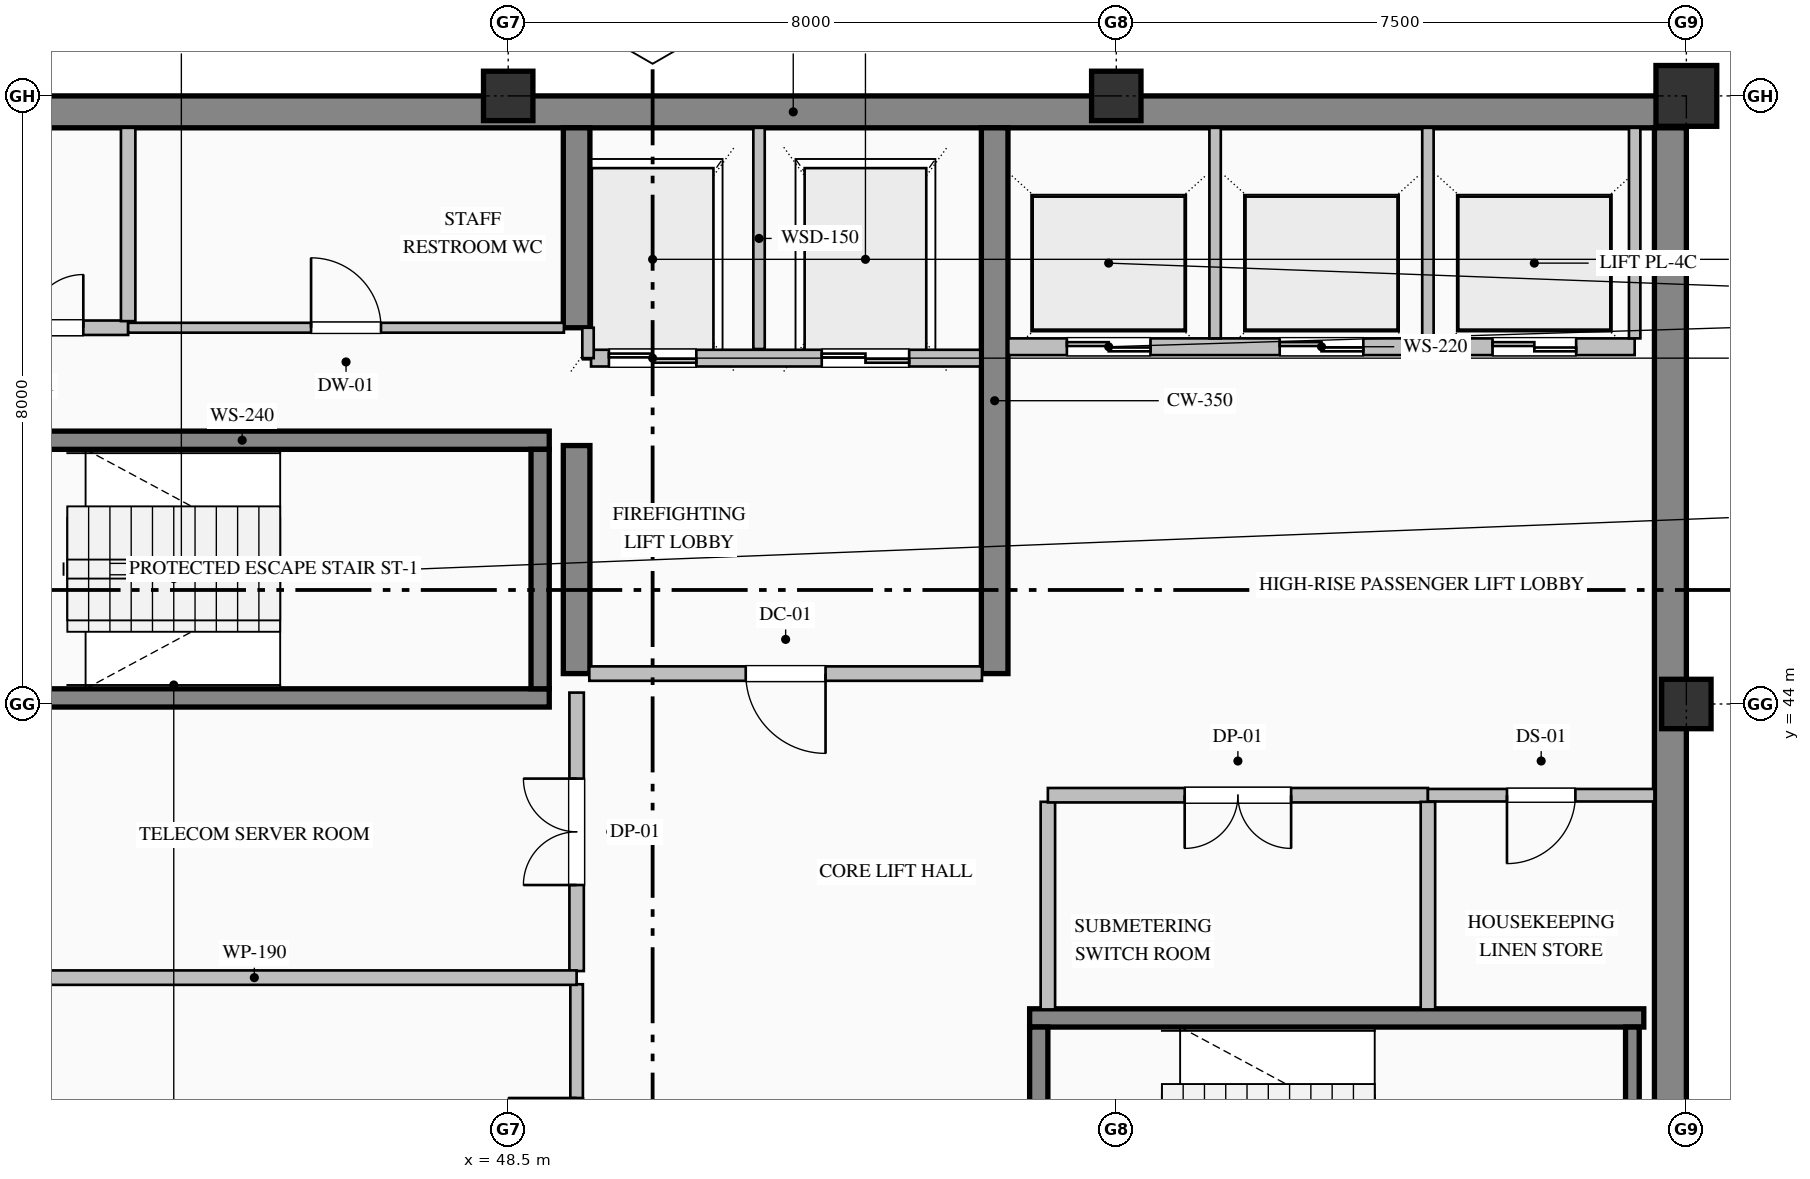
"""IFC4 building model, lengths in metres.
Left out: names, types, materials, properties, quantities, classifications, styles, units other than length and angle.
Written with IfcOpenShell. Run it as: python <this file> out.ifc"""

import sys

from ifc_helpers import new_model, si_unit, direction, frame, frame_2d, origin, origin_2d, place, context, subcontext, project, spatial, rectangle, hollow_rectangle, extrude, element, fill, save


model = new_model("IFC4")
c1 = context("Model", 3, precision=1e-05, world=origin(), true_north=direction((0.0, 1.0)))
c2 = subcontext(c1, "Body", "Model", "MODEL_VIEW")
j1 = project(units=[si_unit("LENGTHUNIT", "METRE"), si_unit("PLANEANGLEUNIT", "RADIAN")], contexts=[c1])
p1 = place(None, origin())
s1 = spatial("IfcSite", under=j1, at=p1, CompositionType="ELEMENT")
p2 = place(p1, origin())
s2 = spatial("IfcBuilding", under=s1, at=p2, CompositionType="ELEMENT")
p3 = place(p2, frame((0.0, 0.0, 359.2)))
s3 = spatial("IfcBuildingStorey", under=s2, at=p3, CompositionType="ELEMENT", Elevation=359.2)
p4 = place(p3, frame((40.5, 51.79, 0.0), z_axis=(0.0, 0.0, 1.0), x_axis=(1.0, 0.0, 0.0)))
e1 = element("IfcWall", 1, at=p4, inside=s3, PredefinedType="SHEAR", context=c2, shape_type="SweptSolid", body=[
    extrude(rectangle(XDim=23.5, YDim=0.42, at=frame_2d((11.75, 0.0))), origin(), (0.0, 0.0, 1.0), 3.785),
])
p5 = place(p3, frame((63.79, 36.32, 0.0), z_axis=(0.0, 0.0, 1.0), x_axis=(0.0, 1.0, 0.0)))
e2 = element("IfcWall", 2, at=p5, inside=s3, PredefinedType="SHEAR", context=c2, shape_type="SweptSolid", body=[
    extrude(rectangle(XDim=15.26, YDim=0.42, at=frame_2d((7.63, 0.0))), origin(), (0.0, 0.0, 1.0), 3.785),
])
p6 = place(p3, frame((49.4, 44.4, 0.0), z_axis=(0.0, 0.0, 1.0), x_axis=(0.0, 1.0, 0.0)))
e3 = element("IfcWall", 3, at=p6, inside=s3, PredefinedType="SHEAR", context=c2, shape_type="SweptSolid", body=[
    extrude(rectangle(XDim=3.0, YDim=0.35, at=frame_2d((1.5, 0.0))), origin(), (0.0, 0.0, 1.0), 3.785),
])
p7 = place(p3, frame((49.4, 48.95, 0.0), z_axis=(0.0, 0.0, 1.0), x_axis=(0.0, 1.0, 0.0)))
e4 = element("IfcWall", 4, at=p7, inside=s3, PredefinedType="SHEAR", context=c2, shape_type="SweptSolid", body=[
    extrude(rectangle(XDim=2.63, YDim=0.35, at=frame_2d((1.315, 0.0))), origin(), (0.0, 0.0, 1.0), 3.785),
])
p8 = place(p3, frame((54.9, 44.4, 0.0), z_axis=(0.0, 0.0, 1.0), x_axis=(0.0, 1.0, 0.0)))
e5 = element("IfcWall", 5, at=p8, inside=s3, PredefinedType="SHEAR", context=c2, shape_type="SweptSolid", body=[
    extrude(rectangle(XDim=7.18, YDim=0.35, at=frame_2d((3.59, 0.0))), origin(), (0.0, 0.0, 1.0), 3.785),
])
for number, where, z_axis, x_axis in (
    (6, (48.5, 52.0, 0.0), (0.0, 0.0, 1.0), (1.0, 0.0, 0.0)),
    (7, (56.5, 52.0, 0.0), (0.0, 0.0, 1.0), (1.0, 0.0, 0.0)),
    (8, (64.0, 44.0, 0.0), (0.0, 0.0, 1.0), (1.0, 0.0, 0.0)),
):
    element("IfcColumn", number, at=place(p3, frame(where, z_axis=z_axis, x_axis=x_axis)), inside=s3, PredefinedType="COLUMN", context=c2, shape_type="SweptSolid", body=[
        extrude(hollow_rectangle(XDim=0.65, YDim=0.65, WallThickness=0.028, at=origin_2d()), origin(), (0.0, 0.0, 1.0), 4.0),
    ])
p9 = place(p3, frame((64.0, 52.0, 0.0), z_axis=(0.0, 0.0, 1.0), x_axis=(1.0, 0.0, 0.0)))
e9 = element("IfcColumn", 9, at=p9, inside=s3, PredefinedType="COLUMN", context=c2, shape_type="SweptSolid", body=[
    extrude(hollow_rectangle(XDim=0.8, YDim=0.8, WallThickness=0.032, at=origin_2d()), origin(), (0.0, 0.0, 1.0), 4.0),
])
for number, where, z_axis, x_axis in (
    (10, (40.96, 47.47, 0.0), (0.0, 0.0, 1.0), (1.0, 0.0, 0.0)),
    (11, (49.04, 44.08, 0.0), (0.0, 0.0, 1.0), (-1.0, 0.0, 0.0)),
):
    element("IfcWall", number, at=place(p3, frame(where, z_axis=z_axis, x_axis=x_axis)), inside=s3, PredefinedType="SOLIDWALL", context=c2, shape_type="SweptSolid", body=[
        extrude(rectangle(XDim=8.08, YDim=0.24, at=frame_2d((4.04, 0.0))), origin(), (0.0, 0.0, 1.0), 4.0),
    ])
p10 = place(p3, frame((48.92, 44.2, 0.0), z_axis=(0.0, 0.0, 1.0), x_axis=(0.0, 1.0, 0.0)))
e12 = element("IfcWall", 12, at=p10, inside=s3, PredefinedType="SOLIDWALL", context=c2, shape_type="SweptSolid", body=[
    extrude(rectangle(XDim=3.15, YDim=0.24, at=frame_2d((1.575, 0.0))), origin(), (0.0, 0.0, 1.0), 4.0),
])
p11 = place(p3, frame((55.36, 39.87, 0.0), z_axis=(0.0, 0.0, 1.0), x_axis=(1.0, 0.0, 0.0)))
e13 = element("IfcWall", 13, at=p11, inside=s3, PredefinedType="SOLIDWALL", context=c2, shape_type="SweptSolid", body=[
    extrude(rectangle(XDim=8.08, YDim=0.24, at=frame_2d((4.04, 0.0))), origin(), (0.0, 0.0, 1.0), 4.0),
])
p12 = place(p3, frame((55.48, 39.75, 0.0), z_axis=(0.0, 0.0, 1.0), x_axis=(0.0, -1.0, 0.0)))
e14 = element("IfcWall", 14, at=p12, inside=s3, PredefinedType="SOLIDWALL", context=c2, shape_type="SweptSolid", body=[
    extrude(rectangle(XDim=3.15, YDim=0.24, at=frame_2d((1.575, 0.0))), origin(), (0.0, 0.0, 1.0), 4.0),
])
p13 = place(p12, frame((1.0, 0.0, 0.0)))
e15 = element("IfcOpeningElement", 15, at=p13, cuts=e14, PredefinedType="OPENING", context=c2, shape_type="SweptSolid", body=[
    extrude(rectangle(XDim=1.15, YDim=2.2, at=frame_2d((0.575, 1.1))), frame((0.0, 0.13, 0.0), z_axis=(0.0, -1.0, 0.0), x_axis=(1.0, 0.0, 0.0)), (0.0, 0.0, 1.0), 0.26),
])
p14 = place(p3, frame((63.29, 36.6, 0.0), z_axis=(0.0, 0.0, 1.0), x_axis=(0.0, 1.0, 0.0)))
e16 = element("IfcWall", 16, at=p14, inside=s3, PredefinedType="SOLIDWALL", context=c2, shape_type="SweptSolid", body=[
    extrude(rectangle(XDim=3.15, YDim=0.18, at=frame_2d((1.575, 0.0))), origin(), (0.0, 0.0, 1.0), 4.0),
])
p15 = place(p3, frame((54.71, 48.55, 0.0), z_axis=(0.0, 0.0, 1.0), x_axis=(-1.0, 0.0, 0.0)))
e17 = element("IfcWall", 17, at=p15, inside=s3, PredefinedType="PARTITIONING", context=c2, shape_type="SweptSolid", body=[
    extrude(rectangle(XDim=5.12, YDim=0.22, at=frame_2d((2.56, 0.0))), origin(), (0.0, 0.0, 1.0), 3.785),
])
p16 = place(p15, frame((3.735, 0.0, 0.0)))
e18 = element("IfcOpeningElement", 18, at=p16, cuts=e17, PredefinedType="OPENING", context=c2, shape_type="SweptSolid", body=[
    extrude(rectangle(XDim=1.15, YDim=2.2, at=frame_2d((0.575, 1.1))), frame((0.0, 0.12, 0.0), z_axis=(0.0, -1.0, 0.0), x_axis=(1.0, 0.0, 0.0)), (0.0, 0.0, 1.0), 0.24),
])
p17 = place(p15, frame((0.935, 0.0, 0.0)))
e19 = element("IfcOpeningElement", 19, at=p17, cuts=e17, PredefinedType="OPENING", context=c2, shape_type="SweptSolid", body=[
    extrude(rectangle(XDim=1.15, YDim=2.2, at=frame_2d((0.575, 1.1))), frame((0.0, 0.12, 0.0), z_axis=(0.0, -1.0, 0.0), x_axis=(1.0, 0.0, 0.0)), (0.0, 0.0, 1.0), 0.24),
])
p18 = place(p3, frame((51.8, 48.67, 0.0), z_axis=(0.0, 0.0, 1.0), x_axis=(0.0, 1.0, 0.0)))
e20 = element("IfcWall", 20, at=p18, inside=s3, PredefinedType="PARTITIONING", context=c2, shape_type="SweptSolid", body=[
    extrude(rectangle(XDim=2.91, YDim=0.15, at=frame_2d((1.455, 0.0))), origin(), (0.0, 0.0, 1.0), 3.785),
])
p19 = place(p3, frame((49.55, 48.55, 0.0), z_axis=(0.0, 0.0, 1.0), x_axis=(0.0, 1.0, 0.0)))
e21 = element("IfcWall", 21, at=p19, inside=s3, PredefinedType="PARTITIONING", context=c2, shape_type="SweptSolid", body=[
    extrude(rectangle(XDim=0.4, YDim=0.15, at=frame_2d((0.2, 0.0))), origin(), (0.0, 0.0, 1.0), 3.785),
])
p20 = place(p3, frame((63.32, 48.7, 0.0), z_axis=(0.0, 0.0, 1.0), x_axis=(-1.0, 0.0, 0.0)))
e22 = element("IfcWall", 22, at=p20, inside=s3, PredefinedType="PARTITIONING", context=c2, shape_type="SweptSolid", body=[
    extrude(rectangle(XDim=8.24, YDim=0.22, at=frame_2d((4.12, 0.0))), origin(), (0.0, 0.0, 1.0), 3.785),
])
p21 = place(p20, frame((6.37, 0.0, 0.0)))
e23 = element("IfcOpeningElement", 23, at=p21, cuts=e22, PredefinedType="OPENING", context=c2, shape_type="SweptSolid", body=[
    extrude(rectangle(XDim=1.1, YDim=2.2, at=frame_2d((0.55, 1.1))), frame((0.0, 0.12, 0.0), z_axis=(0.0, -1.0, 0.0), x_axis=(1.0, 0.0, 0.0)), (0.0, 0.0, 1.0), 0.24),
])
p22 = place(p20, frame((3.57, 0.0, 0.0)))
e24 = element("IfcOpeningElement", 24, at=p22, cuts=e22, PredefinedType="OPENING", context=c2, shape_type="SweptSolid", body=[
    extrude(rectangle(XDim=1.1, YDim=2.2, at=frame_2d((0.55, 1.1))), frame((0.0, 0.12, 0.0), z_axis=(0.0, -1.0, 0.0), x_axis=(1.0, 0.0, 0.0)), (0.0, 0.0, 1.0), 0.24),
])
p23 = place(p20, frame((0.77, 0.0, 0.0)))
e25 = element("IfcOpeningElement", 25, at=p23, cuts=e22, PredefinedType="OPENING", context=c2, shape_type="SweptSolid", body=[
    extrude(rectangle(XDim=1.1, YDim=2.2, at=frame_2d((0.55, 1.1))), frame((0.0, 0.12, 0.0), z_axis=(0.0, -1.0, 0.0), x_axis=(1.0, 0.0, 0.0)), (0.0, 0.0, 1.0), 0.24),
])
for number, where, z_axis, x_axis in (
    (26, (57.8, 48.81, 0.0), (0.0, 0.0, 1.0), (0.0, 1.0, 0.0)),
    (27, (60.6, 48.81, 0.0), (0.0, 0.0, 1.0), (0.0, 1.0, 0.0)),
    (28, (63.32, 48.81, 0.0), (0.0, 0.0, 1.0), (0.0, 1.0, 0.0)),
):
    element("IfcWall", number, at=place(p3, frame(where, z_axis=z_axis, x_axis=x_axis)), inside=s3, PredefinedType="PARTITIONING", context=c2, shape_type="SweptSolid", body=[
        extrude(rectangle(XDim=2.77, YDim=0.15, at=frame_2d((1.385, 0.0))), origin(), (0.0, 0.0, 1.0), 3.785),
    ])
p24 = place(p3, frame((40.92, 48.95, 0.0), z_axis=(0.0, 0.0, 1.0), x_axis=(1.0, 0.0, 0.0)))
e29 = element("IfcWall", 29, at=p24, inside=s3, PredefinedType="PARTITIONING", context=c2, shape_type="SweptSolid", body=[
    extrude(rectangle(XDim=2.58, YDim=0.19, at=frame_2d((1.29, 0.0))), origin(), (0.0, 0.0, 1.0), 3.785),
])
p25 = place(p24, frame((0.59, 0.0, 0.0)))
e30 = element("IfcOpeningElement", 30, at=p25, cuts=e29, PredefinedType="OPENING", context=c2, shape_type="SweptSolid", body=[
    extrude(rectangle(XDim=1.4, YDim=2.25, at=frame_2d((0.7, 1.125))), frame((0.0, 0.105, 0.0), z_axis=(0.0, -1.0, 0.0), x_axis=(1.0, 0.0, 0.0)), (0.0, 0.0, 1.0), 0.21),
])
p26 = place(p3, frame((43.5, 48.95, 0.0), z_axis=(0.0, 0.0, 1.0), x_axis=(1.0, 0.0, 0.0)))
e31 = element("IfcWall", 31, at=p26, inside=s3, PredefinedType="PARTITIONING", context=c2, shape_type="SweptSolid", body=[
    extrude(rectangle(XDim=5.733, YDim=0.13, at=frame_2d((2.866, 0.0))), origin(), (0.0, 0.0, 1.0), 3.785),
])
p27 = place(p26, frame((2.406, 0.0, 0.0)))
e32 = element("IfcOpeningElement", 32, at=p27, cuts=e31, PredefinedType="OPENING", context=c2, shape_type="SweptSolid", body=[
    extrude(rectangle(XDim=0.92, YDim=2.15, at=frame_2d((0.46, 1.075))), frame((0.0, 0.075, 0.0), z_axis=(0.0, -1.0, 0.0), x_axis=(1.0, 0.0, 0.0)), (0.0, 0.0, 1.0), 0.15),
])
p28 = place(p3, frame((54.733, 44.4, 0.0), z_axis=(0.0, 0.0, 1.0), x_axis=(-1.0, 0.0, 0.0)))
e33 = element("IfcWall", 33, at=p28, inside=s3, PredefinedType="PARTITIONING", context=c2, shape_type="SweptSolid", body=[
    extrude(rectangle(XDim=5.166, YDim=0.19, at=frame_2d((2.583, 0.0))), origin(), (0.0, 0.0, 1.0), 3.785),
])
p29 = place(p28, frame((2.058, 0.0, 0.0)))
e34 = element("IfcOpeningElement", 34, at=p29, cuts=e33, PredefinedType="OPENING", context=c2, shape_type="SweptSolid", body=[
    extrude(rectangle(XDim=1.05, YDim=2.15, at=frame_2d((0.525, 1.075))), frame((0.0, 0.105, 0.0), z_axis=(0.0, -1.0, 0.0), x_axis=(1.0, 0.0, 0.0)), (0.0, 0.0, 1.0), 0.21),
])
p30 = place(p3, frame((49.4, 36.42, 0.0), z_axis=(0.0, 0.0, 1.0), x_axis=(0.0, 1.0, 0.0)))
e35 = element("IfcWall", 35, at=p30, inside=s3, PredefinedType="PARTITIONING", context=c2, shape_type="SweptSolid", body=[
    extrude(rectangle(XDim=3.893, YDim=0.165, at=frame_2d((1.947, 0.0))), origin(), (0.0, 0.0, 1.0), 3.027),
])
p31 = place(p30, frame((1.497, 0.0, 0.0)))
e36 = element("IfcOpeningElement", 36, at=p31, cuts=e35, PredefinedType="OPENING", context=c2, shape_type="SweptSolid", body=[
    extrude(rectangle(XDim=0.9, YDim=2.15, at=frame_2d((0.45, 1.075))), frame((0.0, 0.093, 0.0), z_axis=(0.0, -1.0, 0.0), x_axis=(1.0, 0.0, 0.0)), (0.0, 0.0, 1.0), 0.185),
])
p32 = place(p3, frame((49.4, 40.487, 0.0), z_axis=(0.0, 0.0, 1.0), x_axis=(0.0, 1.0, 0.0)))
e37 = element("IfcWall", 37, at=p32, inside=s3, PredefinedType="PARTITIONING", context=c2, shape_type="SweptSolid", body=[
    extrude(rectangle(XDim=3.663, YDim=0.19, at=frame_2d((1.832, 0.0))), origin(), (0.0, 0.0, 1.0), 3.027),
])
p33 = place(p32, frame((1.132, 0.0, 0.0)))
e38 = element("IfcOpeningElement", 38, at=p33, cuts=e37, PredefinedType="OPENING", context=c2, shape_type="SweptSolid", body=[
    extrude(rectangle(XDim=1.4, YDim=2.25, at=frame_2d((0.7, 1.125))), frame((0.0, 0.105, 0.0), z_axis=(0.0, -1.0, 0.0), x_axis=(1.0, 0.0, 0.0)), (0.0, 0.0, 1.0), 0.21),
])
p34 = place(p3, frame((55.6, 42.713, 0.0), z_axis=(0.0, 0.0, 1.0), x_axis=(0.0, -1.0, 0.0)))
e39 = element("IfcWall", 39, at=p34, inside=s3, PredefinedType="PARTITIONING", context=c2, shape_type="SweptSolid", body=[
    extrude(rectangle(XDim=2.731, YDim=0.19, at=frame_2d((1.365, 0.0))), origin(), (0.0, 0.0, 1.0), 3.785),
])
p35 = place(p3, frame((40.92, 40.4, 0.0), z_axis=(0.0, 0.0, 1.0), x_axis=(1.0, 0.0, 0.0)))
e40 = element("IfcWall", 40, at=p35, inside=s3, PredefinedType="PARTITIONING", context=c2, shape_type="SweptSolid", body=[
    extrude(rectangle(XDim=8.48, YDim=0.19, at=frame_2d((4.24, 0.0))), origin(), (0.0, 0.0, 1.0), 3.785),
])
p36 = place(p3, frame((60.6, 42.8, 0.0), z_axis=(0.0, 0.0, 1.0), x_axis=(-1.0, 0.0, 0.0)))
e41 = element("IfcWall", 41, at=p36, inside=s3, PredefinedType="PARTITIONING", context=c2, shape_type="SweptSolid", body=[
    extrude(rectangle(XDim=5.0, YDim=0.19, at=frame_2d((2.5, 0.0))), origin(), (0.0, 0.0, 1.0), 3.785),
])
p37 = place(p36, frame((1.8, 0.0, 0.0)))
e42 = element("IfcOpeningElement", 42, at=p37, cuts=e41, PredefinedType="OPENING", context=c2, shape_type="SweptSolid", body=[
    extrude(rectangle(XDim=1.4, YDim=2.25, at=frame_2d((0.7, 1.125))), frame((0.0, 0.105, 0.0), z_axis=(0.0, -1.0, 0.0), x_axis=(1.0, 0.0, 0.0)), (0.0, 0.0, 1.0), 0.21),
])
p38 = place(p3, frame((63.58, 42.8, 0.0), z_axis=(0.0, 0.0, 1.0), x_axis=(-1.0, 0.0, 0.0)))
e43 = element("IfcWall", 43, at=p38, inside=s3, PredefinedType="PARTITIONING", context=c2, shape_type="SweptSolid", body=[
    extrude(rectangle(XDim=2.98, YDim=0.165, at=frame_2d((1.49, 0.0))), origin(), (0.0, 0.0, 1.0), 3.785),
])
p39 = place(p38, frame((1.04, 0.0, 0.0)))
e44 = element("IfcOpeningElement", 44, at=p39, cuts=e43, PredefinedType="OPENING", context=c2, shape_type="SweptSolid", body=[
    extrude(rectangle(XDim=0.9, YDim=2.15, at=frame_2d((0.45, 1.075))), frame((0.0, 0.093, 0.0), z_axis=(0.0, -1.0, 0.0), x_axis=(1.0, 0.0, 0.0)), (0.0, 0.0, 1.0), 0.185),
])
p40 = place(p3, frame((43.5, 51.58, 0.0), z_axis=(0.0, 0.0, 1.0), x_axis=(0.0, -1.0, 0.0)))
e45 = element("IfcWall", 45, at=p40, inside=s3, PredefinedType="PARTITIONING", context=c2, shape_type="SweptSolid", body=[
    extrude(rectangle(XDim=2.543, YDim=0.19, at=frame_2d((1.271, 0.0))), origin(), (0.0, 0.0, 1.0), 3.785),
])
p41 = place(p3, frame((60.6, 42.713, 0.0), z_axis=(0.0, 0.0, 1.0), x_axis=(0.0, -1.0, 0.0)))
e46 = element("IfcWall", 46, at=p41, inside=s3, PredefinedType="PARTITIONING", context=c2, shape_type="SweptSolid", body=[
    extrude(rectangle(XDim=2.731, YDim=0.19, at=frame_2d((1.365, 0.0))), origin(), (0.0, 0.0, 1.0), 3.785),
])
p42 = place(p16, origin())
e47 = element("IfcDoor", 47, at=p42, inside=s3, OperationType="DOUBLE_DOOR_SLIDING", PredefinedType="DOOR", context=c2, shape_type="SweptSolid", body=[
    extrude(rectangle(XDim=1.15, YDim=2.2, at=frame_2d((0.575, 1.1))), frame((0.0, 0.025, 0.0), z_axis=(0.0, -1.0, 0.0), x_axis=(1.0, 0.0, 0.0)), (0.0, 0.0, 1.0), 0.05),
])
fill(e18, e47)
p43 = place(p17, origin())
e48 = element("IfcDoor", 48, at=p43, inside=s3, OperationType="DOUBLE_DOOR_SLIDING", PredefinedType="DOOR", context=c2, shape_type="SweptSolid", body=[
    extrude(rectangle(XDim=1.15, YDim=2.2, at=frame_2d((0.575, 1.1))), frame((0.0, 0.025, 0.0), z_axis=(0.0, -1.0, 0.0), x_axis=(1.0, 0.0, 0.0)), (0.0, 0.0, 1.0), 0.05),
])
fill(e19, e48)
p44 = place(p21, origin())
e49 = element("IfcDoor", 49, at=p44, inside=s3, OperationType="DOUBLE_DOOR_SLIDING", PredefinedType="DOOR", context=c2, shape_type="SweptSolid", body=[
    extrude(rectangle(XDim=1.1, YDim=2.2, at=frame_2d((0.55, 1.1))), frame((0.0, 0.025, 0.0), z_axis=(0.0, -1.0, 0.0), x_axis=(1.0, 0.0, 0.0)), (0.0, 0.0, 1.0), 0.05),
])
fill(e23, e49)
p45 = place(p22, origin())
e50 = element("IfcDoor", 50, at=p45, inside=s3, OperationType="DOUBLE_DOOR_SLIDING", PredefinedType="DOOR", context=c2, shape_type="SweptSolid", body=[
    extrude(rectangle(XDim=1.1, YDim=2.2, at=frame_2d((0.55, 1.1))), frame((0.0, 0.025, 0.0), z_axis=(0.0, -1.0, 0.0), x_axis=(1.0, 0.0, 0.0)), (0.0, 0.0, 1.0), 0.05),
])
fill(e24, e50)
p46 = place(p23, origin())
e51 = element("IfcDoor", 51, at=p46, inside=s3, OperationType="DOUBLE_DOOR_SLIDING", PredefinedType="DOOR", context=c2, shape_type="SweptSolid", body=[
    extrude(rectangle(XDim=1.1, YDim=2.2, at=frame_2d((0.55, 1.1))), frame((0.0, 0.025, 0.0), z_axis=(0.0, -1.0, 0.0), x_axis=(1.0, 0.0, 0.0)), (0.0, 0.0, 1.0), 0.05),
])
fill(e25, e51)
p47 = place(p29, origin())
e52 = element("IfcDoor", 52, at=p47, inside=s3, OperationType="SINGLE_SWING_LEFT", PredefinedType="DOOR", context=c2, shape_type="SweptSolid", body=[
    extrude(rectangle(XDim=1.05, YDim=2.15, at=frame_2d((0.525, 1.075))), frame((0.0, 0.025, 0.0), z_axis=(0.0, -1.0, 0.0), x_axis=(1.0, 0.0, 0.0)), (0.0, 0.0, 1.0), 0.05),
])
fill(e34, e52)
p48 = place(p31, origin())
e53 = element("IfcDoor", 53, at=p48, inside=s3, OperationType="SINGLE_SWING_RIGHT", PredefinedType="DOOR", context=c2, shape_type="SweptSolid", body=[
    extrude(rectangle(XDim=0.9, YDim=2.15, at=frame_2d((0.45, 1.075))), frame((0.0, 0.025, 0.0), z_axis=(0.0, -1.0, 0.0), x_axis=(1.0, 0.0, 0.0)), (0.0, 0.0, 1.0), 0.05),
])
fill(e36, e53)
p49 = place(p33, origin())
e54 = element("IfcDoor", 54, at=p49, inside=s3, OperationType="DOUBLE_DOOR_SINGLE_SWING", PredefinedType="DOOR", context=c2, shape_type="SweptSolid", body=[
    extrude(rectangle(XDim=1.4, YDim=2.25, at=frame_2d((0.7, 1.125))), frame((0.0, 0.025, 0.0), z_axis=(0.0, -1.0, 0.0), x_axis=(1.0, 0.0, 0.0)), (0.0, 0.0, 1.0), 0.05),
])
fill(e38, e54)
p50 = place(p25, origin())
e55 = element("IfcDoor", 55, at=p50, inside=s3, OperationType="DOUBLE_DOOR_SINGLE_SWING", PredefinedType="DOOR", context=c2, shape_type="SweptSolid", body=[
    extrude(rectangle(XDim=1.4, YDim=2.25, at=frame_2d((0.7, 1.125))), frame((0.0, 0.025, 0.0), z_axis=(0.0, -1.0, 0.0), x_axis=(1.0, 0.0, 0.0)), (0.0, 0.0, 1.0), 0.05),
])
fill(e30, e55)
p51 = place(p27, origin())
e56 = element("IfcDoor", 56, at=p51, inside=s3, OperationType="SINGLE_SWING_LEFT", PredefinedType="DOOR", context=c2, shape_type="SweptSolid", body=[
    extrude(rectangle(XDim=0.92, YDim=2.15, at=frame_2d((0.46, 1.075))), frame((0.0, 0.025, 0.0), z_axis=(0.0, -1.0, 0.0), x_axis=(1.0, 0.0, 0.0)), (0.0, 0.0, 1.0), 0.05),
])
fill(e32, e56)
p52 = place(p37, origin())
e57 = element("IfcDoor", 57, at=p52, inside=s3, OperationType="DOUBLE_DOOR_SINGLE_SWING", PredefinedType="DOOR", context=c2, shape_type="SweptSolid", body=[
    extrude(rectangle(XDim=1.4, YDim=2.25, at=frame_2d((0.7, 1.125))), frame((0.0, 0.025, 0.0), z_axis=(0.0, -1.0, 0.0), x_axis=(1.0, 0.0, 0.0)), (0.0, 0.0, 1.0), 0.05),
])
fill(e42, e57)
p53 = place(p39, origin())
e58 = element("IfcDoor", 58, at=p53, inside=s3, OperationType="SINGLE_SWING_RIGHT", PredefinedType="DOOR", context=c2, shape_type="SweptSolid", body=[
    extrude(rectangle(XDim=0.9, YDim=2.15, at=frame_2d((0.45, 1.075))), frame((0.0, 0.025, 0.0), z_axis=(0.0, -1.0, 0.0), x_axis=(1.0, 0.0, 0.0)), (0.0, 0.0, 1.0), 0.05),
])
fill(e44, e58)
save(model, sys.argv[1])
